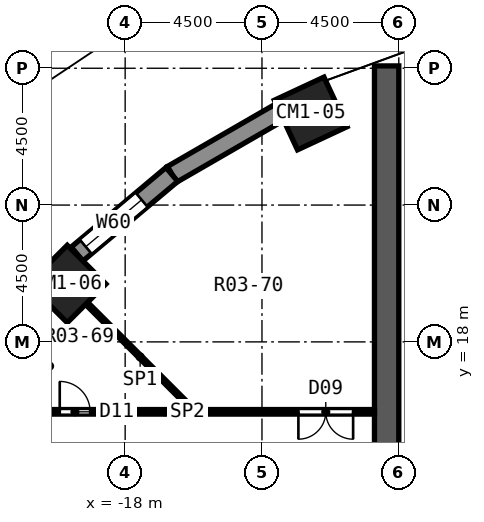
"""IFC4 building model, lengths in metres.
Left out: names, types, materials, properties, quantities, classifications, styles, units other than length and angle.
Written with IfcOpenShell. Run it as: python <this file> out.ifc"""

import sys

from ifc_helpers import new_model, si_unit, direction, frame, frame_2d, origin, origin_2d, place, context, subcontext, project, spatial, polyline, rectangle, outline, extrude, element, fill, save


model = new_model("IFC4")
c1 = context("Model", 3, precision=1e-05, world=origin(), true_north=direction((0.0, 1.0)))
c2 = subcontext(c1, "Body", "Model", "MODEL_VIEW")
j1 = project(units=[si_unit("LENGTHUNIT", "METRE"), si_unit("PLANEANGLEUNIT", "RADIAN")], contexts=[c1])
p1 = place(None, origin())
s1 = spatial("IfcSite", under=j1, at=p1, CompositionType="ELEMENT")
p2 = place(p1, origin())
s2 = spatial("IfcBuilding", under=s1, at=p2, CompositionType="ELEMENT")
p3 = place(p2, origin())
s3 = spatial("IfcBuildingStorey", under=s2, at=p3, CompositionType="ELEMENT", Elevation=0.0)
for number, where, z_axis, x_axis in (
    (1, (-11.897, 25.512, 0.0), (0.0, 0.0, 1.0), (-0.423, 0.906, 0.0)),
    (2, (-19.905, 19.905, 0.0), (0.0, 0.0, 1.0), (-0.707, 0.707, 0.0)),
):
    element("IfcColumn", number, at=place(p3, frame(where, z_axis=z_axis, x_axis=x_axis)), inside=s3, PredefinedType="COLUMN", context=c2, shape_type="SweptSolid", body=[
        extrude(rectangle(XDim=1.8, YDim=1.8, at=origin_2d()), origin(), (0.0, 0.0, 1.0), 5.0),
    ])
p4 = place(p3, frame((-9.4, -27.077, 0.0), z_axis=(0.0, 0.0, 1.0), x_axis=(0.0, 1.0, 0.0)))
e3 = element("IfcWall", 3, at=p4, inside=s3, PredefinedType="SHEAR", context=c2, shape_type="SweptSolid", body=[
    extrude(rectangle(XDim=54.154, YDim=0.8, at=frame_2d((27.077, 0.0))), origin(), (0.0, 0.0, 1.0), 5.0),
])
p5 = place(p4, frame((17.377, 0.0, 0.0)))
e4 = element("IfcOpeningElement", 4, at=p5, cuts=e3, PredefinedType="OPENING", context=c2, shape_type="SweptSolid", body=[
    extrude(rectangle(XDim=1.4, YDim=2.1, at=frame_2d((0.7, 1.05))), frame((0.0, 0.412, 0.0), z_axis=(0.0, -1.0, 0.0), x_axis=(1.0, 0.0, 0.0)), (0.0, 0.0, 1.0), 0.824),
])
p6 = place(p4, frame((21.777, 0.0, 0.3)))
e5 = element("IfcOpeningElement", 5, at=p6, cuts=e3, PredefinedType="OPENING", context=c2, shape_type="SweptSolid", body=[
    extrude(rectangle(XDim=2.4, YDim=2.1, at=frame_2d((1.2, 1.05))), frame((0.0, 0.412, 0.0), z_axis=(0.0, -1.0, 0.0), x_axis=(1.0, 0.0, 0.0)), (0.0, 0.0, 1.0), 0.824),
])
p7 = place(p4, frame((24.377, 0.0, 0.0)))
e6 = element("IfcOpeningElement", 6, at=p7, cuts=e3, PredefinedType="OPENING", context=c2, shape_type="SweptSolid", body=[
    extrude(rectangle(XDim=1.4, YDim=2.1, at=frame_2d((0.7, 1.05))), frame((0.0, 0.412, 0.0), z_axis=(0.0, -1.0, 0.0), x_axis=(1.0, 0.0, 0.0)), (0.0, 0.0, 1.0), 0.824),
])
p8 = place(p4, frame((28.477, 0.0, 0.3)))
e7 = element("IfcOpeningElement", 7, at=p8, cuts=e3, PredefinedType="OPENING", context=c2, shape_type="SweptSolid", body=[
    extrude(rectangle(XDim=2.4, YDim=2.1, at=frame_2d((1.2, 1.05))), frame((0.0, 0.412, 0.0), z_axis=(0.0, -1.0, 0.0), x_axis=(1.0, 0.0, 0.0)), (0.0, 0.0, 1.0), 0.824),
])
p9 = place(p4, frame((33.877, 0.0, 0.0)))
e8 = element("IfcOpeningElement", 8, at=p9, cuts=e3, PredefinedType="OPENING", context=c2, shape_type="SweptSolid", body=[
    extrude(rectangle(XDim=1.4, YDim=2.1, at=frame_2d((0.7, 1.05))), frame((0.0, 0.412, 0.0), z_axis=(0.0, -1.0, 0.0), x_axis=(1.0, 0.0, 0.0)), (0.0, 0.0, 1.0), 0.824),
])
p10 = place(p4, frame((37.877, 0.0, 0.3)))
e9 = element("IfcOpeningElement", 9, at=p10, cuts=e3, PredefinedType="OPENING", context=c2, shape_type="SweptSolid", body=[
    extrude(rectangle(XDim=2.4, YDim=2.1, at=frame_2d((1.2, 1.05))), frame((0.0, 0.412, 0.0), z_axis=(0.0, -1.0, 0.0), x_axis=(1.0, 0.0, 0.0)), (0.0, 0.0, 1.0), 0.824),
])
p11 = place(p3, frame((-12.934, 25.545, 0.0), z_axis=(0.0, 0.0, 1.0), x_axis=(-0.866011732453, -0.500023678693, 0.0)))
e10 = element("IfcWall", 10, at=p11, inside=s3, PredefinedType="SOLIDWALL", context=c2, shape_type="SweptSolid", body=[
    extrude(rectangle(XDim=4.069, YDim=0.6, at=frame_2d((2.035, 0.0))), origin(), (0.0, 0.0, 1.0), 4.45),
])
p12 = place(p3, frame((-16.464, 23.506, 0.0), z_axis=(0.0, 0.0, 1.0), x_axis=(-0.766033337734, -0.642800844336, 0.0)))
e11 = element("IfcWall", 11, at=p12, inside=s3, PredefinedType="SOLIDWALL", context=c2, shape_type="SweptSolid", body=[
    extrude(rectangle(XDim=4.069, YDim=0.6, at=frame_2d((2.035, 0.0))), origin(), (0.0, 0.0, 1.0), 4.45),
])
p13 = place(p12, frame((1.298, 0.0, 0.3)))
e12 = element("IfcOpeningElement", 12, at=p13, cuts=e11, PredefinedType="OPENING", context=c2, shape_type="SweptSolid", body=[
    extrude(rectangle(XDim=2.4, YDim=2.1, at=frame_2d((1.2, 1.05))), frame((0.0, 0.312, 0.0), z_axis=(0.0, -1.0, 0.0), x_axis=(1.0, 0.0, 0.0)), (0.0, 0.0, 1.0), 0.624),
])
p14 = place(p3, frame((-11.641, 26.507, 0.0), z_axis=(-0.342042318612, 0.939682427765, 0.001996804339), x_axis=(0.939684301135, 0.342043000515, 0.0)))
e13 = element("IfcWall", 13, at=p14, inside=s3, PredefinedType="SOLIDWALL", context=c2, shape_type="SweptSolid", body=[
    extrude(outline(polyline([(0.0, 0.0), (2.81, 2.168e-19), (2.81, -4.45), (0.0, -4.45), (0.0, 0.0)])), origin(), (0.0, 0.0, -1.0), 0.38),
])
p15 = place(p3, frame((-19.262, 19.262, 0.0), z_axis=(0.0, 0.0, 1.0), x_axis=(0.707180580359, -0.707032974311, 0.0)))
e14 = element("IfcWall", 14, at=p15, inside=s3, PredefinedType="PARTITIONING", context=c2, shape_type="SweptSolid", body=[
    extrude(rectangle(XDim=4.962, YDim=0.1, at=frame_2d((2.481, 0.0))), origin(), (0.0, 0.0, 1.0), 4.45),
])
p16 = place(p3, frame((-23.601, 15.7, 0.0), z_axis=(0.0, 0.0, 1.0), x_axis=(1.0, 0.0, 0.0)))
e15 = element("IfcWall", 15, at=p16, inside=s3, PredefinedType="PARTITIONING", context=c2, shape_type="SweptSolid", body=[
    extrude(rectangle(XDim=13.801, YDim=0.15, at=frame_2d((6.9, 0.0))), origin(), (0.0, 0.0, 1.0), 4.45),
])
p17 = place(p16, frame((11.299, 0.0, 0.0)))
e16 = element("IfcOpeningElement", 16, at=p17, cuts=e15, PredefinedType="OPENING", context=c2, shape_type="SweptSolid", body=[
    extrude(rectangle(XDim=1.8, YDim=2.1, at=frame_2d((0.9, 1.05))), frame((0.0, 0.087, 0.0), z_axis=(0.0, -1.0, 0.0), x_axis=(1.0, 0.0, 0.0)), (0.0, 0.0, 1.0), 0.174),
])
p18 = place(p16, frame((3.449, 0.0, 0.0)))
e17 = element("IfcOpeningElement", 17, at=p18, cuts=e15, PredefinedType="OPENING", context=c2, shape_type="SweptSolid", body=[
    extrude(rectangle(XDim=1.0, YDim=2.1, at=frame_2d((0.5, 1.05))), frame((0.0, 0.087, 0.0), z_axis=(0.0, -1.0, 0.0), x_axis=(1.0, 0.0, 0.0)), (0.0, 0.0, 1.0), 0.174),
])
p19 = place(p17, frame((1.8, 0.0, 0.0), z_axis=(0.0, 0.0, 1.0), x_axis=(-1.0, 0.0, 0.0)))
e18 = element("IfcDoor", 18, at=p19, inside=s3, OperationType="DOUBLE_DOOR_SINGLE_SWING", PredefinedType="DOOR", context=c2, shape_type="SweptSolid", body=[
    extrude(rectangle(XDim=1.8, YDim=2.1, at=frame_2d((0.9, 1.05))), frame((0.0, 0.025, 0.0), z_axis=(0.0, -1.0, 0.0), x_axis=(1.0, 0.0, 0.0)), (0.0, 0.0, 1.0), 0.05),
])
fill(e16, e18)
p20 = place(p18, origin())
e19 = element("IfcDoor", 19, at=p20, inside=s3, OperationType="SINGLE_SWING_LEFT", PredefinedType="DOOR", context=c2, shape_type="SweptSolid", body=[
    extrude(rectangle(XDim=1.0, YDim=2.1, at=frame_2d((0.5, 1.05))), frame((0.0, 0.025, 0.0), z_axis=(0.0, -1.0, 0.0), x_axis=(1.0, 0.0, 0.0)), (0.0, 0.0, 1.0), 0.05),
])
fill(e17, e19)
p21 = place(p13, origin())
e20 = element("IfcWindow", 20, at=p21, inside=s3, PartitioningType="SINGLE_PANEL", PredefinedType="WINDOW", context=c2, shape_type="SweptSolid", body=[
    extrude(rectangle(XDim=2.4, YDim=2.1, at=frame_2d((1.2, 1.05))), frame((0.0, 0.03, 0.0), z_axis=(0.0, -1.0, 0.0), x_axis=(1.0, 0.0, 0.0)), (0.0, 0.0, 1.0), 0.06),
])
fill(e12, e20)
save(model, sys.argv[1])
